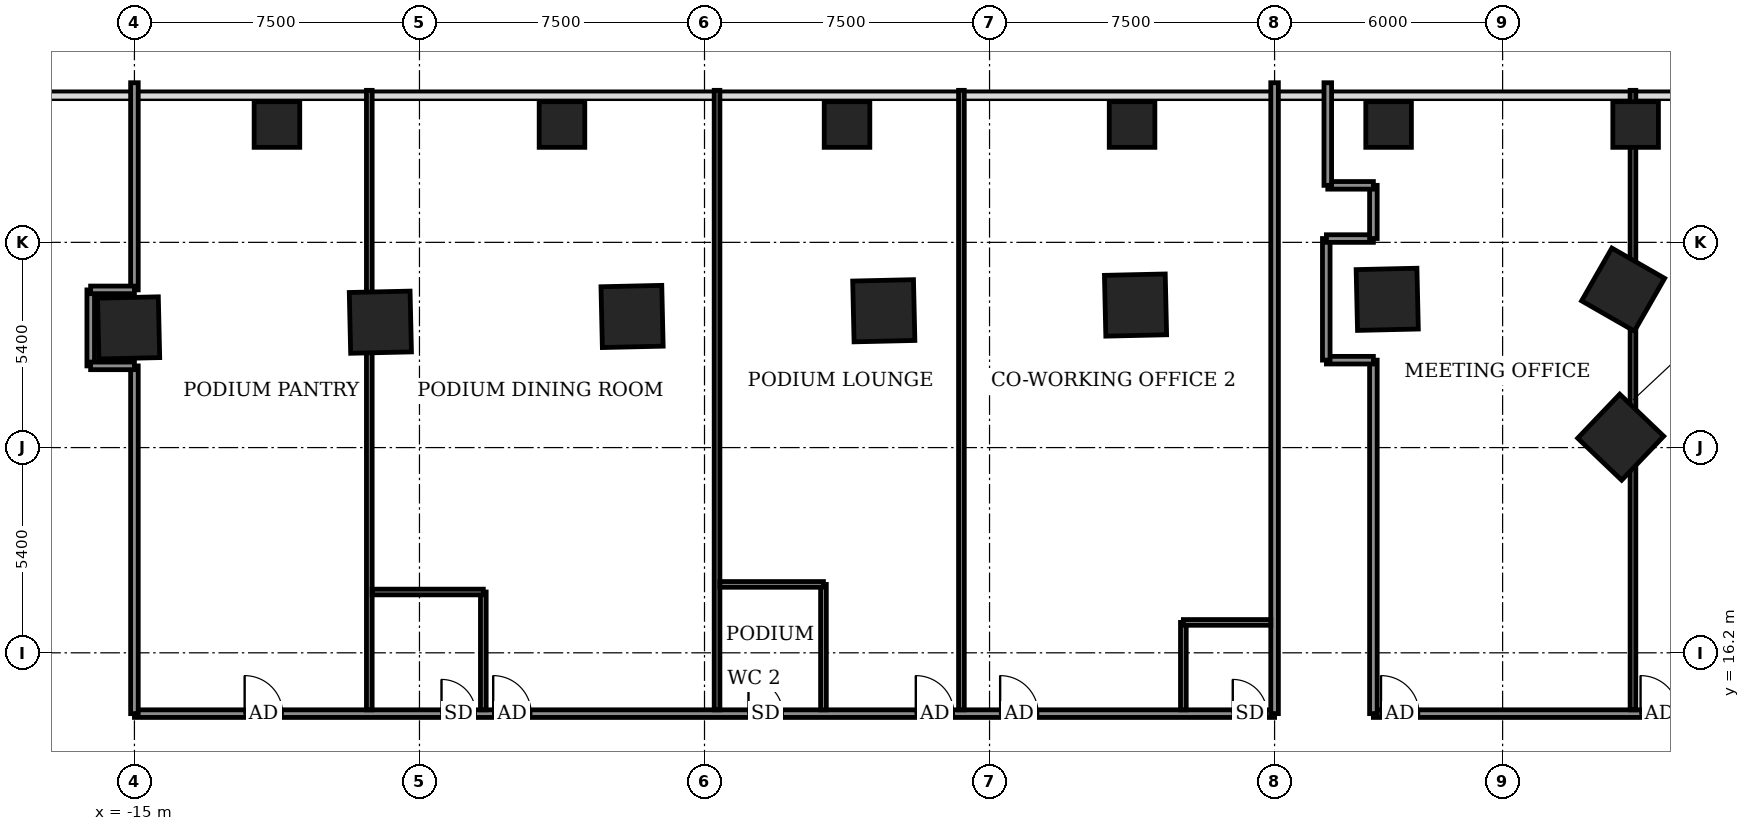
"""IFC4 building model, lengths in metres.
Left out: names, types, materials, properties, quantities, classifications, styles, units other than length and angle.
Written with IfcOpenShell. Run it as: python <this file> out.ifc"""

import sys

from ifc_helpers import new_model, si_unit, direction, frame, frame_2d, origin, origin_2d, place, context, subcontext, project, spatial, rectangle, extrude, element, fill, save


model = new_model("IFC4")
c1 = context("Model", 3, precision=1e-05, world=origin(), true_north=direction((0.0, 1.0)))
c2 = subcontext(c1, "Body", "Model", "MODEL_VIEW")
j1 = project(units=[si_unit("LENGTHUNIT", "METRE"), si_unit("PLANEANGLEUNIT", "RADIAN")], contexts=[c1])
p1 = place(None, origin())
s1 = spatial("IfcSite", under=j1, at=p1, CompositionType="ELEMENT")
p2 = place(p1, origin())
s2 = spatial("IfcBuilding", under=s1, at=p2, CompositionType="ELEMENT")
p3 = place(p2, frame((0.0, 0.0, 6.0)))
s3 = spatial("IfcBuildingStorey", under=s2, at=p3, CompositionType="ELEMENT", Elevation=6.0)
for number, where, z_axis, x_axis in (
    (1, (24.107, 21.874, -0.55), (0.0, 0.0, 1.0), (-0.723, 0.691, 0.0)),
    (2, (24.171, 25.757, -0.55), (0.0, 0.0, 1.0), (-0.868, 0.497, 0.0)),
    (3, (17.964, 25.501, -0.55), (0.0, 0.0, 1.0), (-1.0, -0.023, 0.0)),
    (4, (11.341, 25.35, -0.55), (0.0, 0.0, 1.0), (-1.0, -0.023, 0.0)),
    (5, (4.717, 25.2, -0.55), (0.0, 0.0, 1.0), (-1.0, -0.023, 0.0)),
    (6, (-1.906, 25.05, -0.55), (0.0, 0.0, 1.0), (-1.0, -0.023, 0.0)),
    (7, (-8.529, 24.899, -0.55), (0.0, 0.0, 1.0), (-1.0, -0.023, 0.0)),
    (8, (-15.153, 24.749, -0.55), (0.0, 0.0, 1.0), (-1.0, -0.023, 0.0)),
):
    element("IfcColumn", number, at=place(p3, frame(where, z_axis=z_axis, x_axis=x_axis)), inside=s3, PredefinedType="COLUMN", context=c2, shape_type="SweptSolid", body=[
        extrude(rectangle(XDim=1.6, YDim=1.6, at=origin_2d()), origin(), (0.0, 0.0, 1.0), 5.0),
    ])
for number, where, z_axis, x_axis in (
    (9, (-11.25, 30.1, -0.55), (0.0, 0.0, 1.0), (1.0, 0.0, 0.0)),
    (10, (-3.75, 30.1, -0.55), (0.0, 0.0, 1.0), (1.0, 0.0, 0.0)),
    (11, (3.75, 30.1, -0.55), (0.0, 0.0, 1.0), (1.0, 0.0, 0.0)),
    (12, (11.25, 30.1, -0.55), (0.0, 0.0, 1.0), (1.0, 0.0, 0.0)),
    (13, (18.0, 30.1, -0.55), (0.0, 0.0, 1.0), (1.0, 0.0, 0.0)),
    (14, (24.5, 30.1, -0.55), (0.0, 0.0, 1.0), (1.0, 0.0, 0.0)),
):
    element("IfcColumn", number, at=place(p3, frame(where, z_axis=z_axis, x_axis=x_axis)), inside=s3, PredefinedType="COLUMN", context=c2, shape_type="SweptSolid", body=[
        extrude(rectangle(XDim=1.2, YDim=1.2, at=origin_2d()), origin(), (0.0, 0.0, 1.0), 5.0),
    ])
p4 = place(p3, frame((-15.0, 14.6, 0.0), z_axis=(0.0, 0.0, 1.0), x_axis=(1.0, 0.0, 0.0)))
e15 = element("IfcWall", 15, at=p4, inside=s3, PredefinedType="PARTITIONING", context=c2, shape_type="SweptSolid", body=[
    extrude(rectangle(XDim=30.0, YDim=0.2, at=frame_2d((15.0, 0.0))), origin(), (0.0, 0.0, 1.0), 4.45),
])
p5 = place(p4, frame((2.9, 0.0, 0.0)))
e16 = element("IfcOpeningElement", 16, at=p5, cuts=e15, PredefinedType="OPENING", context=c2, shape_type="SweptSolid", body=[
    extrude(rectangle(XDim=1.0, YDim=2.1, at=frame_2d((0.5, 1.05))), frame((0.0, 0.11, 0.0), z_axis=(0.0, -1.0, 0.0), x_axis=(1.0, 0.0, 0.0)), (0.0, 0.0, 1.0), 0.22),
])
p6 = place(p4, frame((9.44, 0.0, 0.0)))
e17 = element("IfcOpeningElement", 17, at=p6, cuts=e15, PredefinedType="OPENING", context=c2, shape_type="SweptSolid", body=[
    extrude(rectangle(XDim=1.0, YDim=2.1, at=frame_2d((0.5, 1.05))), frame((0.0, 0.11, 0.0), z_axis=(0.0, -1.0, 0.0), x_axis=(1.0, 0.0, 0.0)), (0.0, 0.0, 1.0), 0.22),
])
p7 = place(p4, frame((8.08, 0.0, 0.0)))
e18 = element("IfcOpeningElement", 18, at=p7, cuts=e15, PredefinedType="OPENING", context=c2, shape_type="SweptSolid", body=[
    extrude(rectangle(XDim=0.9, YDim=2.1, at=frame_2d((0.45, 1.05))), frame((0.0, 0.11, 0.0), z_axis=(0.0, -1.0, 0.0), x_axis=(1.0, 0.0, 0.0)), (0.0, 0.0, 1.0), 0.22),
])
p8 = place(p4, frame((20.56, 0.0, 0.0)))
e19 = element("IfcOpeningElement", 19, at=p8, cuts=e15, PredefinedType="OPENING", context=c2, shape_type="SweptSolid", body=[
    extrude(rectangle(XDim=1.0, YDim=2.1, at=frame_2d((0.5, 1.05))), frame((0.0, 0.11, 0.0), z_axis=(0.0, -1.0, 0.0), x_axis=(1.0, 0.0, 0.0)), (0.0, 0.0, 1.0), 0.22),
])
p9 = place(p4, frame((16.157, 0.0, 0.0)))
e20 = element("IfcOpeningElement", 20, at=p9, cuts=e15, PredefinedType="OPENING", context=c2, shape_type="SweptSolid", body=[
    extrude(rectangle(XDim=0.9, YDim=2.1, at=frame_2d((0.45, 1.05))), frame((0.0, 0.11, 0.0), z_axis=(0.0, -1.0, 0.0), x_axis=(1.0, 0.0, 0.0)), (0.0, 0.0, 1.0), 0.22),
])
p10 = place(p4, frame((22.779, 0.0, 0.0)))
e21 = element("IfcOpeningElement", 21, at=p10, cuts=e15, PredefinedType="OPENING", context=c2, shape_type="SweptSolid", body=[
    extrude(rectangle(XDim=1.0, YDim=2.1, at=frame_2d((0.5, 1.05))), frame((0.0, 0.11, 0.0), z_axis=(0.0, -1.0, 0.0), x_axis=(1.0, 0.0, 0.0)), (0.0, 0.0, 1.0), 0.22),
])
p11 = place(p4, frame((28.9, 0.0, 0.0)))
e22 = element("IfcOpeningElement", 22, at=p11, cuts=e15, PredefinedType="OPENING", context=c2, shape_type="SweptSolid", body=[
    extrude(rectangle(XDim=0.9, YDim=2.1, at=frame_2d((0.45, 1.05))), frame((0.0, 0.11, 0.0), z_axis=(0.0, -1.0, 0.0), x_axis=(1.0, 0.0, 0.0)), (0.0, 0.0, 1.0), 0.22),
])
p12 = place(p3, frame((-15.0, 14.6, 0.0), z_axis=(0.0, 0.0, 1.0), x_axis=(0.0, 1.0, 0.0)))
e23 = element("IfcWall", 23, at=p12, inside=s3, PredefinedType="PARTITIONING", context=c2, shape_type="SweptSolid", body=[
    extrude(rectangle(XDim=9.149, YDim=0.2, at=frame_2d((4.574, 0.0))), origin(), (0.0, 0.0, 1.0), 4.45),
])
p13 = place(p3, frame((-8.82, 14.7, 0.0), z_axis=(0.0, 0.0, 1.0), x_axis=(0.0, 1.0, 0.0)))
e24 = element("IfcWall", 24, at=p13, inside=s3, PredefinedType="PARTITIONING", context=c2, shape_type="SweptSolid", body=[
    extrude(rectangle(XDim=16.3, YDim=0.15, at=frame_2d((8.15, 0.0))), origin(), (0.0, 0.0, 1.0), 0.94),
])
p14 = place(p3, frame((-5.82, 14.7, 0.0), z_axis=(0.0, 0.0, 1.0), x_axis=(0.0, 1.0, 0.0)))
e25 = element("IfcWall", 25, at=p14, inside=s3, PredefinedType="PARTITIONING", context=c2, shape_type="SweptSolid", body=[
    extrude(rectangle(XDim=3.1, YDim=0.15, at=frame_2d((1.55, 0.0))), origin(), (0.0, 0.0, 1.0), 4.45),
])
p15 = place(p3, frame((0.33, 14.7, 0.0), z_axis=(0.0, 0.0, 1.0), x_axis=(0.0, 1.0, 0.0)))
e26 = element("IfcWall", 26, at=p15, inside=s3, PredefinedType="PARTITIONING", context=c2, shape_type="SweptSolid", body=[
    extrude(rectangle(XDim=16.3, YDim=0.15, at=frame_2d((8.15, 0.0))), origin(), (0.0, 0.0, 1.0), 0.94),
])
p16 = place(p3, frame((3.13, 14.7, 0.0), z_axis=(0.0, 0.0, 1.0), x_axis=(0.0, 1.0, 0.0)))
e27 = element("IfcWall", 27, at=p16, inside=s3, PredefinedType="PARTITIONING", context=c2, shape_type="SweptSolid", body=[
    extrude(rectangle(XDim=3.3, YDim=0.15, at=frame_2d((1.65, 0.0))), origin(), (0.0, 0.0, 1.0), 4.45),
])
p17 = place(p3, frame((6.76, 14.7, 0.0), z_axis=(0.0, 0.0, 1.0), x_axis=(0.0, 1.0, 0.0)))
e28 = element("IfcWall", 28, at=p17, inside=s3, PredefinedType="PARTITIONING", context=c2, shape_type="SweptSolid", body=[
    extrude(rectangle(XDim=16.3, YDim=0.15, at=frame_2d((8.15, 0.0))), origin(), (0.0, 0.0, 1.0), 0.94),
])
p18 = place(p3, frame((12.6, 14.7, 0.0), z_axis=(0.0, 0.0, 1.0), x_axis=(0.0, 1.0, 0.0)))
e29 = element("IfcWall", 29, at=p18, inside=s3, PredefinedType="PARTITIONING", context=c2, shape_type="SweptSolid", body=[
    extrude(rectangle(XDim=2.3, YDim=0.15, at=frame_2d((1.15, 0.0))), origin(), (0.0, 0.0, 1.0), 4.45),
])
p19 = place(p3, frame((15.0, 14.6, 0.0), z_axis=(0.0, 0.0, 1.0), x_axis=(0.0, 1.0, 0.0)))
e30 = element("IfcWall", 30, at=p19, inside=s3, PredefinedType="PARTITIONING", context=c2, shape_type="SweptSolid", body=[
    extrude(rectangle(XDim=16.6, YDim=0.2, at=frame_2d((8.3, 0.0))), origin(), (0.0, 0.0, 1.0), 0.94),
])
p20 = place(p3, frame((17.6, 14.6, 0.0), z_axis=(0.0, 0.0, 1.0), x_axis=(1.0, 0.0, 0.0)))
e31 = element("IfcWall", 31, at=p20, inside=s3, PredefinedType="PARTITIONING", context=c2, shape_type="SweptSolid", body=[
    extrude(rectangle(XDim=16.7, YDim=0.2, at=frame_2d((8.35, 0.0))), origin(), (0.0, 0.0, 1.0), 4.45),
])
p21 = place(p20, frame((7.03, 0.0, 0.0)))
e32 = element("IfcOpeningElement", 32, at=p21, cuts=e31, PredefinedType="OPENING", context=c2, shape_type="SweptSolid", body=[
    extrude(rectangle(XDim=1.0, YDim=2.1, at=frame_2d((0.5, 1.05))), frame((0.0, 0.11, 0.0), z_axis=(0.0, -1.0, 0.0), x_axis=(1.0, 0.0, 0.0)), (0.0, 0.0, 1.0), 0.22),
])
p22 = place(p20, frame((0.2, 0.0, 0.0)))
e33 = element("IfcOpeningElement", 33, at=p22, cuts=e31, PredefinedType="OPENING", context=c2, shape_type="SweptSolid", body=[
    extrude(rectangle(XDim=1.0, YDim=2.1, at=frame_2d((0.5, 1.05))), frame((0.0, 0.11, 0.0), z_axis=(0.0, -1.0, 0.0), x_axis=(1.0, 0.0, 0.0)), (0.0, 0.0, 1.0), 0.22),
])
p23 = place(p3, frame((17.6, 14.6, 0.0), z_axis=(0.0, 0.0, 1.0), x_axis=(0.0, 1.0, 0.0)))
e34 = element("IfcWall", 34, at=p23, inside=s3, PredefinedType="PARTITIONING", context=c2, shape_type="SweptSolid", body=[
    extrude(rectangle(XDim=9.301, YDim=0.2, at=frame_2d((4.65, 0.0))), origin(), (0.0, 0.0, 1.0), 4.45),
])
p24 = place(p3, frame((24.43, 14.7, 0.0), z_axis=(0.0, 0.0, 1.0), x_axis=(0.0, 1.0, 0.0)))
e35 = element("IfcWall", 35, at=p24, inside=s3, PredefinedType="PARTITIONING", context=c2, shape_type="SweptSolid", body=[
    extrude(rectangle(XDim=16.3, YDim=0.15, at=frame_2d((8.15, 0.0))), origin(), (0.0, 0.0, 1.0), 0.94),
])
p25 = place(p3, frame((12.6, 17.0, 0.0), z_axis=(0.0, 0.0, 1.0), x_axis=(1.0, 0.0, 0.0)))
e36 = element("IfcWall", 36, at=p25, inside=s3, PredefinedType="PARTITIONING", context=c2, shape_type="SweptSolid", body=[
    extrude(rectangle(XDim=2.3, YDim=0.15, at=frame_2d((1.15, 0.0))), origin(), (0.0, 0.0, 1.0), 4.45),
])
p26 = place(p3, frame((-8.745, 17.8, 0.0), z_axis=(0.0, 0.0, 1.0), x_axis=(1.0, 0.0, 0.0)))
e37 = element("IfcWall", 37, at=p26, inside=s3, PredefinedType="PARTITIONING", context=c2, shape_type="SweptSolid", body=[
    extrude(rectangle(XDim=2.925, YDim=0.15, at=frame_2d((1.462, 0.0))), origin(), (0.0, 0.0, 1.0), 4.45),
])
p27 = place(p3, frame((0.405, 18.0, 0.0), z_axis=(0.0, 0.0, 1.0), x_axis=(1.0, 0.0, 0.0)))
e38 = element("IfcWall", 38, at=p27, inside=s3, PredefinedType="PARTITIONING", context=c2, shape_type="SweptSolid", body=[
    extrude(rectangle(XDim=2.725, YDim=0.15, at=frame_2d((1.362, 0.0))), origin(), (0.0, 0.0, 1.0), 4.45),
])
p28 = place(p3, frame((-16.15, 23.749, 0.0), z_axis=(0.0, 0.0, 1.0), x_axis=(0.0, 1.0, 0.0)))
e39 = element("IfcWall", 39, at=p28, inside=s3, PredefinedType="PARTITIONING", context=c2, shape_type="SweptSolid", body=[
    extrude(rectangle(XDim=2.0, YDim=0.2, at=frame_2d((1.0, 0.0))), origin(), (0.0, 0.0, 1.0), 4.45),
])
p29 = place(p3, frame((-16.153, 23.75, 0.0), z_axis=(0.0, 0.0, 1.0), x_axis=(1.0, 0.0, 0.0)))
e40 = element("IfcWall", 40, at=p29, inside=s3, PredefinedType="PARTITIONING", context=c2, shape_type="SweptSolid", body=[
    extrude(rectangle(XDim=1.153, YDim=0.2, at=frame_2d((0.577, 0.0))), origin(), (0.0, 0.0, 1.0), 4.45),
])
p30 = place(p3, frame((16.364, 23.9, 0.0), z_axis=(0.0, 0.0, 1.0), x_axis=(1.0, 0.0, 0.0)))
e41 = element("IfcWall", 41, at=p30, inside=s3, PredefinedType="PARTITIONING", context=c2, shape_type="SweptSolid", body=[
    extrude(rectangle(XDim=1.236, YDim=0.2, at=frame_2d((0.618, 0.0))), origin(), (0.0, 0.0, 1.0), 4.45),
])
p31 = place(p3, frame((16.36, 23.901, 0.0), z_axis=(0.0, 0.0, 1.0), x_axis=(0.0, 1.0, 0.0)))
e42 = element("IfcWall", 42, at=p31, inside=s3, PredefinedType="PARTITIONING", context=c2, shape_type="SweptSolid", body=[
    extrude(rectangle(XDim=3.2, YDim=0.2, at=frame_2d((1.6, 0.0))), origin(), (0.0, 0.0, 1.0), 4.45),
])
p32 = place(p3, frame((-15.0, 25.749, 0.0), z_axis=(0.0, 0.0, 1.0), x_axis=(0.0, 1.0, 0.0)))
e43 = element("IfcWall", 43, at=p32, inside=s3, PredefinedType="PARTITIONING", context=c2, shape_type="SweptSolid", body=[
    extrude(rectangle(XDim=5.451, YDim=0.2, at=frame_2d((2.726, 0.0))), origin(), (0.0, 0.0, 1.0), 0.94),
])
p33 = place(p3, frame((-16.153, 25.75, 0.0), z_axis=(0.0, 0.0, 1.0), x_axis=(1.0, 0.0, 0.0)))
e44 = element("IfcWall", 44, at=p33, inside=s3, PredefinedType="PARTITIONING", context=c2, shape_type="SweptSolid", body=[
    extrude(rectangle(XDim=1.153, YDim=0.2, at=frame_2d((0.577, 0.0))), origin(), (0.0, 0.0, 1.0), 4.45),
])
p34 = place(p3, frame((16.364, 27.1, 0.0), z_axis=(0.0, 0.0, 1.0), x_axis=(1.0, 0.0, 0.0)))
e45 = element("IfcWall", 45, at=p34, inside=s3, PredefinedType="PARTITIONING", context=c2, shape_type="SweptSolid", body=[
    extrude(rectangle(XDim=1.236, YDim=0.2, at=frame_2d((0.618, 0.0))), origin(), (0.0, 0.0, 1.0), 4.45),
])
p35 = place(p3, frame((17.6, 27.101, 0.0), z_axis=(0.0, 0.0, 1.0), x_axis=(0.0, 1.0, 0.0)))
e46 = element("IfcWall", 46, at=p35, inside=s3, PredefinedType="PARTITIONING", context=c2, shape_type="SweptSolid", body=[
    extrude(rectangle(XDim=1.399, YDim=0.2, at=frame_2d((0.699, 0.0))), origin(), (0.0, 0.0, 1.0), 4.45),
])
p36 = place(p3, frame((16.4, 28.5, 0.0), z_axis=(0.0, 0.0, 1.0), x_axis=(1.0, 0.0, 0.0)))
e47 = element("IfcWall", 47, at=p36, inside=s3, PredefinedType="PARTITIONING", context=c2, shape_type="SweptSolid", body=[
    extrude(rectangle(XDim=1.2, YDim=0.2, at=frame_2d((0.6, 0.0))), origin(), (0.0, 0.0, 1.0), 4.45),
])
p37 = place(p3, frame((16.4, 28.5, 0.0), z_axis=(0.0, 0.0, 1.0), x_axis=(0.0, 1.0, 0.0)))
e48 = element("IfcWall", 48, at=p37, inside=s3, PredefinedType="PARTITIONING", context=c2, shape_type="SweptSolid", body=[
    extrude(rectangle(XDim=2.7, YDim=0.2, at=frame_2d((1.35, 0.0))), origin(), (0.0, 0.0, 1.0), 0.94),
])
p38 = place(p21, origin())
e49 = element("IfcDoor", 49, at=p38, inside=s3, OperationType="SINGLE_SWING_LEFT", PredefinedType="DOOR", context=c2, shape_type="SweptSolid", body=[
    extrude(rectangle(XDim=1.0, YDim=2.1, at=frame_2d((0.5, 1.05))), frame((0.0, 0.025, 0.0), z_axis=(0.0, -1.0, 0.0), x_axis=(1.0, 0.0, 0.0)), (0.0, 0.0, 1.0), 0.05),
])
fill(e32, e49)
p39 = place(p5, origin())
e50 = element("IfcDoor", 50, at=p39, inside=s3, OperationType="SINGLE_SWING_RIGHT", PredefinedType="DOOR", context=c2, shape_type="SweptSolid", body=[
    extrude(rectangle(XDim=1.0, YDim=2.1, at=frame_2d((0.5, 1.05))), frame((0.0, 0.025, 0.0), z_axis=(0.0, -1.0, 0.0), x_axis=(1.0, 0.0, 0.0)), (0.0, 0.0, 1.0), 0.05),
])
fill(e16, e50)
p40 = place(p6, origin())
e51 = element("IfcDoor", 51, at=p40, inside=s3, OperationType="SINGLE_SWING_LEFT", PredefinedType="DOOR", context=c2, shape_type="SweptSolid", body=[
    extrude(rectangle(XDim=1.0, YDim=2.1, at=frame_2d((0.5, 1.05))), frame((0.0, 0.025, 0.0), z_axis=(0.0, -1.0, 0.0), x_axis=(1.0, 0.0, 0.0)), (0.0, 0.0, 1.0), 0.05),
])
fill(e17, e51)
p41 = place(p7, origin())
e52 = element("IfcDoor", 52, at=p41, inside=s3, OperationType="SINGLE_SWING_RIGHT", PredefinedType="DOOR", context=c2, shape_type="SweptSolid", body=[
    extrude(rectangle(XDim=0.9, YDim=2.1, at=frame_2d((0.45, 1.05))), frame((0.0, 0.025, 0.0), z_axis=(0.0, -1.0, 0.0), x_axis=(1.0, 0.0, 0.0)), (0.0, 0.0, 1.0), 0.05),
])
fill(e18, e52)
p42 = place(p8, origin())
e53 = element("IfcDoor", 53, at=p42, inside=s3, OperationType="SINGLE_SWING_RIGHT", PredefinedType="DOOR", context=c2, shape_type="SweptSolid", body=[
    extrude(rectangle(XDim=1.0, YDim=2.1, at=frame_2d((0.5, 1.05))), frame((0.0, 0.025, 0.0), z_axis=(0.0, -1.0, 0.0), x_axis=(1.0, 0.0, 0.0)), (0.0, 0.0, 1.0), 0.05),
])
fill(e19, e53)
p43 = place(p9, origin())
e54 = element("IfcDoor", 54, at=p43, inside=s3, OperationType="SINGLE_SWING_LEFT", PredefinedType="DOOR", context=c2, shape_type="SweptSolid", body=[
    extrude(rectangle(XDim=0.9, YDim=2.1, at=frame_2d((0.45, 1.05))), frame((0.0, 0.025, 0.0), z_axis=(0.0, -1.0, 0.0), x_axis=(1.0, 0.0, 0.0)), (0.0, 0.0, 1.0), 0.05),
])
fill(e20, e54)
p44 = place(p10, origin())
e55 = element("IfcDoor", 55, at=p44, inside=s3, OperationType="SINGLE_SWING_LEFT", PredefinedType="DOOR", context=c2, shape_type="SweptSolid", body=[
    extrude(rectangle(XDim=1.0, YDim=2.1, at=frame_2d((0.5, 1.05))), frame((0.0, 0.025, 0.0), z_axis=(0.0, -1.0, 0.0), x_axis=(1.0, 0.0, 0.0)), (0.0, 0.0, 1.0), 0.05),
])
fill(e21, e55)
p45 = place(p11, origin())
e56 = element("IfcDoor", 56, at=p45, inside=s3, OperationType="SINGLE_SWING_RIGHT", PredefinedType="DOOR", context=c2, shape_type="SweptSolid", body=[
    extrude(rectangle(XDim=0.9, YDim=2.1, at=frame_2d((0.45, 1.05))), frame((0.0, 0.025, 0.0), z_axis=(0.0, -1.0, 0.0), x_axis=(1.0, 0.0, 0.0)), (0.0, 0.0, 1.0), 0.05),
])
fill(e22, e56)
p46 = place(p22, origin())
e57 = element("IfcDoor", 57, at=p46, inside=s3, OperationType="SINGLE_SWING_RIGHT", PredefinedType="DOOR", context=c2, shape_type="SweptSolid", body=[
    extrude(rectangle(XDim=1.0, YDim=2.1, at=frame_2d((0.5, 1.05))), frame((0.0, 0.025, 0.0), z_axis=(0.0, -1.0, 0.0), x_axis=(1.0, 0.0, 0.0)), (0.0, 0.0, 1.0), 0.05),
])
fill(e33, e57)
save(model, sys.argv[1])
